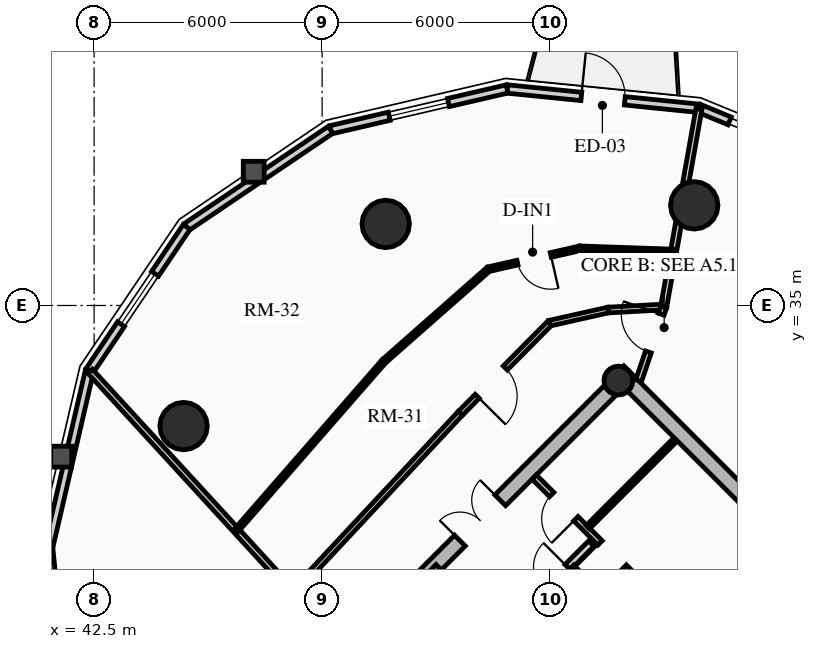
"""IFC4 building model, lengths in metres.
Left out: names, types, materials, properties, quantities, classifications, styles, units other than length and angle.
Written with IfcOpenShell. Run it as: python <this file> out.ifc"""

import sys

from ifc_helpers import new_model, si_unit, direction, frame, frame_2d, origin, origin_2d, place, context, subcontext, project, spatial, rectangle, circle, hollow_circle, extrude, source, transform, mapped, element, fill, save


model = new_model("IFC4")
c1 = context("Model", 3, precision=1e-05, world=origin(), true_north=direction((0.0, 1.0)))
c2 = subcontext(c1, "Body", "Model", "MODEL_VIEW")
j1 = project(units=[si_unit("LENGTHUNIT", "METRE"), si_unit("PLANEANGLEUNIT", "RADIAN")], contexts=[c1])
p1 = place(None, origin())
s1 = spatial("IfcSite", under=j1, at=p1, CompositionType="ELEMENT")
p2 = place(p1, origin())
s2 = spatial("IfcBuilding", under=s1, at=p2, CompositionType="ELEMENT")
p3 = place(p2, frame((0.0, 0.0, 163.24)))
s3 = spatial("IfcBuildingStorey", under=s2, at=p3, CompositionType="ELEMENT", Elevation=163.24)
p4 = place(p3, frame((66.268, 23.298, 0.0), z_axis=(0.0, 0.0, 1.0), x_axis=(-0.707106781187, 0.707106781187, 0.0)))
e1 = element("IfcWall", 1, at=p4, inside=s3, PredefinedType="SHEAR", context=c2, shape_type="SweptSolid", body=[
    extrude(rectangle(XDim=14.1, YDim=0.4, at=frame_2d((7.05, 0.0))), origin(), (0.0, 0.0, 1.0), 2.91),
])
p5 = place(p3, frame((48.873, 25.561, 0.0), z_axis=(0.0, 0.0, 1.0), x_axis=(0.707106781187, 0.707106781187, 0.0)))
e2 = element("IfcWall", 2, at=p5, inside=s3, PredefinedType="SHEAR", context=c2, shape_type="SweptSolid", body=[
    extrude(rectangle(XDim=10.7, YDim=0.4, at=frame_2d((5.35, 0.0))), origin(), (0.0, 0.0, 1.0), 2.91),
])
m1 = source(origin(), c2, "Body", "SweptSolid", [
    extrude(rectangle(XDim=1.5, YDim=2.02, at=frame_2d((0.75, 1.01))), frame((0.0, 0.21, 0.0), z_axis=(0.0, -1.0, 0.0), x_axis=(1.0, 0.0, 0.0)), (0.0, 0.0, 1.0), 0.42),
])
p6 = place(p5, frame((4.6, 0.0, 0.0)))
e3 = element("IfcOpeningElement", 3, at=p6, cuts=e2, PredefinedType="OPENING", context=c2, shape_type="MappedRepresentation", body=[
    mapped(m1, transform((0.0, 0.0, 0.0), x_axis=(1.0, 0.0, 0.0), y_axis=(0.0, 1.0, 0.0), z_axis=(0.0, 0.0, 1.0), scale=1.0)),
])
p7 = place(p3, frame((61.06, 18.373, 0.0), z_axis=(0.0, 0.0, 1.0), x_axis=(-0.707106781187, 0.707106781187, 0.0)))
e4 = element("IfcWall", 4, at=p7, inside=s3, PredefinedType="SHEAR", context=c2, shape_type="SweptSolid", body=[
    extrude(rectangle(XDim=13.7, YDim=0.35, at=frame_2d((6.85, 0.0))), origin(), (0.0, 0.0, 1.0), 2.91),
])
m2 = source(origin(), c2, "Body", "SweptSolid", [
    extrude(rectangle(XDim=1.1, YDim=2.015, at=frame_2d((0.55, 1.007))), frame((0.0, 0.185, 0.0), z_axis=(0.0, -1.0, 0.0), x_axis=(1.0, 0.0, 0.0)), (0.0, 0.0, 1.0), 0.37),
])
p8 = place(p7, frame((4.85, 0.0, 0.0)))
e5 = element("IfcOpeningElement", 5, at=p8, cuts=e4, PredefinedType="OPENING", context=c2, shape_type="MappedRepresentation", body=[
    mapped(m2, transform((0.0, 0.0, 0.0), x_axis=(1.0, 0.0, 0.0), y_axis=(0.0, 1.0, 0.0), z_axis=(0.0, 0.0, 1.0), scale=1.0)),
])
p9 = place(p7, frame((0.625, 0.0, 0.0)))
e6 = element("IfcOpeningElement", 6, at=p9, cuts=e4, PredefinedType="OPENING", context=c2, shape_type="MappedRepresentation", body=[
    mapped(m2, transform((0.0, 0.0, 0.0), x_axis=(1.0, 0.0, 0.0), y_axis=(0.0, 1.0, 0.0), z_axis=(0.0, 0.0, 1.0), scale=1.0)),
])
p10 = place(p7, frame((2.625, 0.0, 0.0)))
e7 = element("IfcOpeningElement", 7, at=p10, cuts=e4, PredefinedType="OPENING", context=c2, shape_type="MappedRepresentation", body=[
    mapped(m2, transform((0.0, 0.0, 0.0), x_axis=(1.0, 0.0, 0.0), y_axis=(0.0, 1.0, 0.0), z_axis=(0.0, 0.0, 1.0), scale=1.0)),
])
m3 = source(origin(), c2, "Body", "SweptSolid", [
    extrude(rectangle(XDim=1.15, YDim=2.02, at=frame_2d((0.575, 1.01))), frame((0.0, 0.185, 0.0), z_axis=(0.0, -1.0, 0.0), x_axis=(1.0, 0.0, 0.0)), (0.0, 0.0, 1.0), 0.37),
])
p11 = place(p7, frame((7.27, 0.0, 0.0)))
e8 = element("IfcOpeningElement", 8, at=p11, cuts=e4, PredefinedType="OPENING", context=c2, shape_type="MappedRepresentation", body=[
    mapped(m3, transform((0.0, 0.0, 0.0), x_axis=(1.0, 0.0, 0.0), y_axis=(0.0, 1.0, 0.0), z_axis=(0.0, 0.0, 1.0), scale=1.0)),
])
p12 = place(p3, frame((58.893, 25.674, 0.0), z_axis=(0.0, 0.0, 1.0), x_axis=(0.707106781187, 0.707106781187, 0.0)))
e9 = element("IfcWall", 9, at=p12, inside=s3, PredefinedType="SHEAR", context=c2, shape_type="SweptSolid", body=[
    extrude(rectangle(XDim=3.285, YDim=0.35, at=frame_2d((1.643, 0.0))), origin(), (0.0, 0.0, 1.0), 2.91),
])
p13 = place(p3, frame((56.294, 33.024, 0.0), z_axis=(0.0, 0.0, 1.0), x_axis=(0.707106781187, 0.707106781187, 0.0)))
e10 = element("IfcColumn", 10, at=p13, inside=s3, PredefinedType="COLUMN", context=c2, shape_type="SweptSolid", body=[
    extrude(hollow_circle(Radius=0.38, WallThickness=0.032, at=origin_2d()), origin(), (0.0, 0.0, 1.0), 2.91),
])
for number, where, z_axis, x_axis in (
    (11, (58.291, 37.635, 0.0), (0.0, 0.0, 1.0), (1.0, 0.0, 0.0)),
    (12, (50.173, 37.146, 0.0), (0.0, 0.0, 1.0), (1.0, 0.0, 0.0)),
    (13, (44.854, 31.827, 0.0), (0.0, 0.0, 1.0), (1.0, 0.0, 0.0)),
):
    element("IfcColumn", number, at=place(p3, frame(where, z_axis=z_axis, x_axis=x_axis)), inside=s3, PredefinedType="USERDEFINED", context=c2, shape_type="SweptSolid", body=[
        extrude(circle(Radius=0.625, at=origin_2d()), origin(), (0.0, 0.0, 1.0), 2.91),
    ])
p14 = place(p3, frame((58.418, 40.189, 0.0), z_axis=(0.0, 0.0, 1.0), x_axis=(0.924556017656, -0.381046152345, 0.0)))
e14 = element("IfcWall", 14, at=p14, inside=s3, PredefinedType="SOLIDWALL", context=c2, shape_type="SweptSolid", body=[
    extrude(rectangle(XDim=0.87, YDim=0.22, at=frame_2d((0.435, 0.0))), origin(), (0.0, 0.0, 1.0), 2.245),
])
p15 = place(p3, frame((53.367, 40.698, 0.0), z_axis=(0.0, 0.0, 1.0), x_axis=(0.994959267396, -0.100279889424, 0.0)))
e15 = element("IfcWall", 15, at=p15, inside=s3, PredefinedType="SOLIDWALL", context=c2, shape_type="SweptSolid", body=[
    extrude(rectangle(XDim=5.076, YDim=0.22, at=frame_2d((2.538, 0.0))), origin(), (0.0, 0.0, 1.0), 2.245),
])
m4 = source(origin(), c2, "Body", "SweptSolid", [
    extrude(rectangle(XDim=1.15, YDim=2.005, at=frame_2d((0.575, 1.002))), frame((0.0, 0.12, 0.0), z_axis=(0.0, -1.0, 0.0), x_axis=(1.0, 0.0, 0.0)), (0.0, 0.0, 1.0), 0.24),
])
p16 = place(p15, frame((1.963, 0.0, 0.0)))
e16 = element("IfcOpeningElement", 16, at=p16, cuts=e15, PredefinedType="OPENING", context=c2, shape_type="MappedRepresentation", body=[
    mapped(m4, transform((0.0, 0.0, 0.0), x_axis=(1.0, 0.0, 0.0), y_axis=(0.0, 1.0, 0.0), z_axis=(0.0, 0.0, 1.0), scale=1.0)),
])
p17 = place(p3, frame((48.721, 39.622, 0.0), z_axis=(0.0, 0.0, 1.0), x_axis=(0.974206226622, 0.225659540039, 0.0)))
e17 = element("IfcWall", 17, at=p17, inside=s3, PredefinedType="SOLIDWALL", context=c2, shape_type="SweptSolid", body=[
    extrude(rectangle(XDim=4.769, YDim=0.22, at=frame_2d((2.385, 0.0))), origin(), (0.0, 0.0, 1.0), 2.245),
])
m5 = source(origin(), c2, "Body", "SweptSolid", [
    extrude(rectangle(XDim=1.6, YDim=1.3, at=frame_2d((0.8, 0.65))), frame((0.0, 0.12, 0.0), z_axis=(0.0, -1.0, 0.0), x_axis=(1.0, 0.0, 0.0)), (0.0, 0.0, 1.0), 0.24),
])
p18 = place(p17, frame((1.585, 0.0, 0.65)))
e18 = element("IfcOpeningElement", 18, at=p18, cuts=e17, PredefinedType="OPENING", context=c2, shape_type="MappedRepresentation", body=[
    mapped(m5, transform((0.0, 0.0, 0.0), x_axis=(1.0, 0.0, 0.0), y_axis=(0.0, 1.0, 0.0), z_axis=(0.0, 0.0, 1.0), scale=1.0)),
])
p19 = place(p3, frame((44.935, 37.065, 0.0), z_axis=(0.0, 0.0, 1.0), x_axis=(0.828739009952, 0.559635286042, 0.0)))
e19 = element("IfcWall", 19, at=p19, inside=s3, PredefinedType="SOLIDWALL", context=c2, shape_type="SweptSolid", body=[
    extrude(rectangle(XDim=4.569, YDim=0.22, at=frame_2d((2.284, 0.0))), origin(), (0.0, 0.0, 1.0), 2.245),
])
p20 = place(p3, frame((42.378, 33.279, 0.0), z_axis=(0.0, 0.0, 1.0), x_axis=(0.559635286042, 0.828739009952, 0.0)))
e20 = element("IfcWall", 20, at=p20, inside=s3, PredefinedType="SOLIDWALL", context=c2, shape_type="SweptSolid", body=[
    extrude(rectangle(XDim=4.569, YDim=0.22, at=frame_2d((2.284, 0.0))), origin(), (0.0, 0.0, 1.0), 2.245),
])
p21 = place(p20, frame((1.484, 0.0, 0.65)))
e21 = element("IfcOpeningElement", 21, at=p21, cuts=e20, PredefinedType="OPENING", context=c2, shape_type="MappedRepresentation", body=[
    mapped(m5, transform((0.0, 0.0, 0.0), x_axis=(1.0, 0.0, 0.0), y_axis=(0.0, 1.0, 0.0), z_axis=(0.0, 0.0, 1.0), scale=1.0)),
])
p22 = place(p3, frame((41.302, 28.633, 0.0), z_axis=(0.0, 0.0, 1.0), x_axis=(0.225659540039, 0.974206226622, 0.0)))
e22 = element("IfcWall", 22, at=p22, inside=s3, PredefinedType="SOLIDWALL", context=c2, shape_type="SweptSolid", body=[
    extrude(rectangle(XDim=4.769, YDim=0.22, at=frame_2d((2.385, 0.0))), origin(), (0.0, 0.0, 1.0), 2.245),
])
p23 = place(p3, frame((41.811, 23.582, 0.0), z_axis=(0.0, 0.0, 1.0), x_axis=(-0.100279889424, 0.994959267396, 0.0)))
e23 = element("IfcWall", 23, at=p23, inside=s3, PredefinedType="SOLIDWALL", context=c2, shape_type="SweptSolid", body=[
    extrude(rectangle(XDim=5.076, YDim=0.22, at=frame_2d((2.538, 0.0))), origin(), (0.0, 0.0, 1.0), 2.245),
])
p24 = place(p23, frame((1.738, 0.0, 0.65)))
e24 = element("IfcOpeningElement", 24, at=p24, cuts=e23, PredefinedType="OPENING", context=c2, shape_type="MappedRepresentation", body=[
    mapped(m5, transform((0.0, 0.0, 0.0), x_axis=(1.0, 0.0, 0.0), y_axis=(0.0, 1.0, 0.0), z_axis=(0.0, 0.0, 1.0), scale=1.0)),
])
p25 = place(p3, frame((53.264, 26.416, 0.0), z_axis=(0.0, 0.0, 1.0), x_axis=(0.707106781187, 0.707106781187, 0.0)))
e25 = element("IfcWall", 25, at=p25, inside=s3, PredefinedType="PARTITIONING", context=c2, shape_type="SweptSolid", body=[
    extrude(rectangle(XDim=3.28, YDim=0.2, at=frame_2d((1.64, 0.0))), origin(), (0.0, 0.0, 1.0), 2.675),
])
m6 = source(origin(), c2, "Body", "SweptSolid", [
    extrude(rectangle(XDim=1.0, YDim=2.015, at=frame_2d((0.5, 1.007))), frame((0.0, 0.11, 0.0), z_axis=(0.0, -1.0, 0.0), x_axis=(1.0, 0.0, 0.0)), (0.0, 0.0, 1.0), 0.22),
])
p26 = place(p25, frame((0.14, 0.0, 0.0)))
e26 = element("IfcOpeningElement", 26, at=p26, cuts=e25, PredefinedType="OPENING", context=c2, shape_type="MappedRepresentation", body=[
    mapped(m6, transform((0.0, 0.0, 0.0), x_axis=(1.0, 0.0, 0.0), y_axis=(0.0, 1.0, 0.0), z_axis=(0.0, 0.0, 1.0), scale=1.0)),
])
m7 = source(origin(), c2, "Body", "SweptSolid", [
    extrude(rectangle(XDim=0.9, YDim=2.005, at=frame_2d((0.45, 1.002))), frame((0.0, 0.11, 0.0), z_axis=(0.0, -1.0, 0.0), x_axis=(1.0, 0.0, 0.0)), (0.0, 0.0, 1.0), 0.22),
])
p27 = place(p25, frame((1.5, 0.0, 0.0)))
e27 = element("IfcOpeningElement", 27, at=p27, cuts=e25, PredefinedType="OPENING", context=c2, shape_type="MappedRepresentation", body=[
    mapped(m7, transform((0.0, 0.0, 0.0), x_axis=(1.0, 0.0, 0.0), y_axis=(0.0, 1.0, 0.0), z_axis=(0.0, 0.0, 1.0), scale=1.0)),
])
p28 = place(p3, frame((56.673, 26.529, 0.0), z_axis=(0.0, 0.0, 1.0), x_axis=(-0.707052764397, 0.70716079385, 0.0)))
e28 = element("IfcWall", 28, at=p28, inside=s3, PredefinedType="PARTITIONING", context=c2, shape_type="SweptSolid", body=[
    extrude(rectangle(XDim=2.26, YDim=0.125, at=frame_2d((1.13, 0.0))), origin(), (0.0, 0.0, 1.0), 2.675),
])
m8 = source(origin(), c2, "Body", "SweptSolid", [
    extrude(rectangle(XDim=0.9, YDim=2.005, at=frame_2d((0.45, 1.002))), frame((0.0, 0.073, 0.0), z_axis=(0.0, -1.0, 0.0), x_axis=(1.0, 0.0, 0.0)), (0.0, 0.0, 1.0), 0.145),
])
p29 = place(p28, frame((0.65, 0.0, 0.0)))
e29 = element("IfcOpeningElement", 29, at=p29, cuts=e28, PredefinedType="OPENING", context=c2, shape_type="MappedRepresentation", body=[
    mapped(m8, transform((0.0, 0.0, 0.0), x_axis=(1.0, 0.0, 0.0), y_axis=(0.0, 1.0, 0.0), z_axis=(0.0, 0.0, 1.0), scale=1.0)),
])
p30 = place(p3, frame((56.839, 27.728, 0.0), z_axis=(0.0, 0.0, 1.0), x_axis=(-0.707106781187, 0.707106781187, 0.0)))
e30 = element("IfcWall", 30, at=p30, inside=s3, PredefinedType="PARTITIONING", context=c2, shape_type="SweptSolid", body=[
    extrude(rectangle(XDim=3.9, YDim=0.16, at=frame_2d((1.95, 0.0))), origin(), (0.0, 0.0, 1.0), 2.675),
])
m9 = source(origin(), c2, "Body", "SweptSolid", [
    extrude(rectangle(XDim=0.9, YDim=2.005, at=frame_2d((0.45, 1.002))), frame((0.0, 0.09, 0.0), z_axis=(0.0, -1.0, 0.0), x_axis=(1.0, 0.0, 0.0)), (0.0, 0.0, 1.0), 0.18),
])
p31 = place(p30, frame((0.55, 0.0, 0.0)))
e31 = element("IfcOpeningElement", 31, at=p31, cuts=e30, PredefinedType="OPENING", context=c2, shape_type="MappedRepresentation", body=[
    mapped(m9, transform((0.0, 0.0, 0.0), x_axis=(1.0, 0.0, 0.0), y_axis=(0.0, 1.0, 0.0), z_axis=(0.0, 0.0, 1.0), scale=1.0)),
])
p32 = place(p30, frame((2.35, 0.0, 0.0)))
e32 = element("IfcOpeningElement", 32, at=p32, cuts=e30, PredefinedType="OPENING", context=c2, shape_type="MappedRepresentation", body=[
    mapped(m9, transform((0.0, 0.0, 0.0), x_axis=(1.0, 0.0, 0.0), y_axis=(0.0, 1.0, 0.0), z_axis=(0.0, 0.0, 1.0), scale=1.0)),
])
p33 = place(p3, frame((55.492, 29.167, 0.0), z_axis=(0.0, 0.0, 1.0), x_axis=(0.707144688645, 0.707068871696, 0.0)))
e33 = element("IfcWall", 33, at=p33, inside=s3, PredefinedType="PARTITIONING", context=c2, shape_type="SweptSolid", body=[
    extrude(rectangle(XDim=3.22, YDim=0.125, at=frame_2d((1.61, 0.0))), origin(), (0.0, 0.0, 1.0), 2.212),
])
p34 = place(p3, frame((57.486, 34.96, 0.0), z_axis=(0.0, 0.0, 1.0), x_axis=(-0.998483871836, -0.055045051404, 0.0)))
e34 = element("IfcWall", 34, at=p34, inside=s3, PredefinedType="PARTITIONING", context=c2, shape_type="SweptSolid", body=[
    extrude(rectangle(XDim=1.464, YDim=0.15, at=frame_2d((0.732, 0.0))), origin(), (0.0, 0.0, 1.0), 2.245),
])
p35 = place(p3, frame((56.025, 34.88, 0.0), z_axis=(0.0, 0.0, 1.0), x_axis=(-0.975729093394, -0.218981132301, 0.0)))
e35 = element("IfcWall", 35, at=p35, inside=s3, PredefinedType="PARTITIONING", context=c2, shape_type="SweptSolid", body=[
    extrude(rectangle(XDim=1.575, YDim=0.15, at=frame_2d((0.788, 0.0))), origin(), (0.0, 0.0, 1.0), 2.245),
])
p36 = place(p3, frame((54.488, 34.535, 0.0), z_axis=(0.0, 0.0, 1.0), x_axis=(-0.703666289339, -0.710530613871, 0.0)))
e36 = element("IfcWall", 36, at=p36, inside=s3, PredefinedType="PARTITIONING", context=c2, shape_type="SweptSolid", body=[
    extrude(rectangle(XDim=3.343, YDim=0.15, at=frame_2d((1.672, 0.0))), origin(), (0.0, 0.0, 1.0), 2.245),
])
m10 = source(origin(), c2, "Body", "SweptSolid", [
    extrude(rectangle(XDim=1.05, YDim=2.015, at=frame_2d((0.525, 1.007))), frame((0.0, 0.085, 0.0), z_axis=(0.0, -1.0, 0.0), x_axis=(1.0, 0.0, 0.0)), (0.0, 0.0, 1.0), 0.17),
])
p37 = place(p36, frame((1.66, 0.0, 0.0)))
e37 = element("IfcOpeningElement", 37, at=p37, cuts=e36, PredefinedType="OPENING", context=c2, shape_type="MappedRepresentation", body=[
    mapped(m10, transform((0.0, 0.0, 0.0), x_axis=(1.0, 0.0, 0.0), y_axis=(0.0, 1.0, 0.0), z_axis=(0.0, 0.0, 1.0), scale=1.0)),
])
p38 = place(p3, frame((52.135, 32.159, 0.0), z_axis=(0.0, 0.0, 1.0), x_axis=(-0.682546302454, -0.730842353047, 0.0)))
e38 = element("IfcWall", 38, at=p38, inside=s3, PredefinedType="PARTITIONING", context=c2, shape_type="SweptSolid", body=[
    extrude(rectangle(XDim=6.445, YDim=0.15, at=frame_2d((3.223, 0.0))), origin(), (0.0, 0.0, 1.0), 2.245),
])
p39 = place(p3, frame((57.486, 34.96, 0.0), z_axis=(0.0, 0.0, 1.0), x_axis=(0.175432895983, 0.984491391027, 0.0)))
e39 = element("IfcWall", 39, at=p39, inside=s3, PredefinedType="PARTITIONING", context=c2, shape_type="SweptSolid", body=[
    extrude(rectangle(XDim=5.291, YDim=0.16, at=frame_2d((2.646, 0.0))), origin(), (0.0, 0.0, 1.0), 2.245),
])
p40 = place(p3, frame((47.736, 27.449, 0.0), z_axis=(0.0, 0.0, 1.0), x_axis=(-0.676056254668, 0.736850012231, 0.0)))
e40 = element("IfcWall", 40, at=p40, inside=s3, PredefinedType="PARTITIONING", context=c2, shape_type="SweptSolid", body=[
    extrude(rectangle(XDim=7.899, YDim=0.16, at=frame_2d((3.95, 0.0))), origin(), (0.0, 0.0, 1.0), 2.245),
])
p41 = place(p3, frame((56.828, 33.021, 0.0), z_axis=(0.0, 0.0, 1.0), x_axis=(0.321300161671, 0.94697740528, 0.0)))
e41 = element("IfcWall", 41, at=p41, inside=s3, PredefinedType="PARTITIONING", context=c2, shape_type="SweptSolid", body=[
    extrude(rectangle(XDim=2.049, YDim=0.16, at=frame_2d((1.024, 0.0))), origin(), (0.0, 0.0, 1.0), 2.245),
])
m11 = source(origin(), c2, "Body", "SweptSolid", [
    extrude(rectangle(XDim=1.05, YDim=2.015, at=frame_2d((0.525, 1.007))), frame((0.0, 0.09, 0.0), z_axis=(0.0, -1.0, 0.0), x_axis=(1.0, 0.0, 0.0)), (0.0, 0.0, 1.0), 0.18),
])
p42 = place(p41, frame((0.798, 0.0, 0.0)))
e42 = element("IfcOpeningElement", 42, at=p42, cuts=e41, PredefinedType="OPENING", context=c2, shape_type="MappedRepresentation", body=[
    mapped(m11, transform((0.0, 0.0, 0.0), x_axis=(1.0, 0.0, 0.0), y_axis=(0.0, 1.0, 0.0), z_axis=(0.0, 0.0, 1.0), scale=1.0)),
])
p43 = place(p3, frame((57.746, 36.419, 0.0), z_axis=(0.0, 0.0, 1.0), x_axis=(-0.999409872703, 0.03434976484, 0.0)))
e43 = element("IfcWall", 43, at=p43, inside=s3, PredefinedType="PARTITIONING", context=c2, shape_type="SweptSolid", body=[
    extrude(rectangle(XDim=2.466, YDim=0.125, at=frame_2d((1.233, 0.0))), origin(), (0.0, 0.0, 1.0), 2.245),
])
p44 = place(p3, frame((55.281, 36.504, 0.0), z_axis=(0.0, 0.0, 1.0), x_axis=(-0.974908832019, -0.222604513096, 0.0)))
e44 = element("IfcWall", 44, at=p44, inside=s3, PredefinedType="PARTITIONING", context=c2, shape_type="SweptSolid", body=[
    extrude(rectangle(XDim=2.468, YDim=0.125, at=frame_2d((1.234, 0.0))), origin(), (0.0, 0.0, 1.0), 2.245),
])
p45 = place(p44, frame((0.784, 0.0, 0.0)))
e45 = element("IfcOpeningElement", 45, at=p45, cuts=e44, PredefinedType="OPENING", context=c2, shape_type="MappedRepresentation", body=[
    mapped(m8, transform((0.0, 0.0, 0.0), x_axis=(1.0, 0.0, 0.0), y_axis=(0.0, 1.0, 0.0), z_axis=(0.0, 0.0, 1.0), scale=1.0)),
])
p46 = place(p3, frame((52.876, 35.954, 0.0), z_axis=(0.0, 0.0, 1.0), x_axis=(-0.750317340408, -0.661077823469, 0.0)))
e46 = element("IfcWall", 46, at=p46, inside=s3, PredefinedType="PARTITIONING", context=c2, shape_type="SweptSolid", body=[
    extrude(rectangle(XDim=3.669, YDim=0.125, at=frame_2d((1.834, 0.0))), origin(), (0.0, 0.0, 1.0), 2.245),
])
p47 = place(p3, frame((50.123, 33.529, 0.0), z_axis=(0.0, 0.0, 1.0), x_axis=(-0.657371249324, -0.753566878626, 0.0)))
e47 = element("IfcWall", 47, at=p47, inside=s3, PredefinedType="PARTITIONING", context=c2, shape_type="SweptSolid", body=[
    extrude(rectangle(XDim=5.906, YDim=0.125, at=frame_2d((2.953, 0.0))), origin(), (0.0, 0.0, 1.0), 2.245),
])
m12 = source(origin(), c2, "Body", "SweptSolid", [
    extrude(rectangle(XDim=1.15, YDim=2.005, at=frame_2d((0.575, 1.002))), frame((0.0, 0.025, 0.0), z_axis=(0.0, -1.0, 0.0), x_axis=(1.0, 0.0, 0.0)), (0.0, 0.0, 1.0), 0.05),
])
p48 = place(p16, origin())
e48 = element("IfcDoor", 48, at=p48, inside=s3, OperationType="SINGLE_SWING_LEFT", PredefinedType="DOOR", context=c2, shape_type="MappedRepresentation", body=[
    mapped(m12, transform((0.0, 0.0, 0.0), x_axis=(1.0, 0.0, 0.0), y_axis=(0.0, 1.0, 0.0), z_axis=(0.0, 0.0, 1.0), scale=1.0)),
])
fill(e16, e48)
m13 = source(origin(), c2, "Body", "SweptSolid", [
    extrude(rectangle(XDim=1.6, YDim=1.3, at=frame_2d((0.8, 0.65))), frame((0.0, 0.03, 0.0), z_axis=(0.0, -1.0, 0.0), x_axis=(1.0, 0.0, 0.0)), (0.0, 0.0, 1.0), 0.06),
])
p49 = place(p18, origin())
e49 = element("IfcWindow", 49, at=p49, inside=s3, PartitioningType="SINGLE_PANEL", PredefinedType="WINDOW", context=c2, shape_type="MappedRepresentation", body=[
    mapped(m13, transform((0.0, 0.0, 0.0), x_axis=(1.0, 0.0, 0.0), y_axis=(0.0, 1.0, 0.0), z_axis=(0.0, 0.0, 1.0), scale=1.0)),
])
fill(e18, e49)
p50 = place(p21, origin())
e50 = element("IfcWindow", 50, at=p50, inside=s3, PartitioningType="SINGLE_PANEL", PredefinedType="WINDOW", context=c2, shape_type="MappedRepresentation", body=[
    mapped(m13, transform((0.0, 0.0, 0.0), x_axis=(1.0, 0.0, 0.0), y_axis=(0.0, 1.0, 0.0), z_axis=(0.0, 0.0, 1.0), scale=1.0)),
])
fill(e21, e50)
m14 = source(origin(), c2, "Body", "SweptSolid", [
    extrude(rectangle(XDim=1.5, YDim=2.02, at=frame_2d((0.75, 1.01))), frame((0.0, 0.025, 0.0), z_axis=(0.0, -1.0, 0.0), x_axis=(1.0, 0.0, 0.0)), (0.0, 0.0, 1.0), 0.05),
])
p51 = place(p6, origin())
e51 = element("IfcDoor", 51, at=p51, inside=s3, OperationType="DOUBLE_DOOR_SINGLE_SWING", PredefinedType="DOOR", context=c2, shape_type="MappedRepresentation", body=[
    mapped(m14, transform((0.0, 0.0, 0.0), x_axis=(1.0, 0.0, 0.0), y_axis=(0.0, 1.0, 0.0), z_axis=(0.0, 0.0, 1.0), scale=1.0)),
])
fill(e3, e51)
m15 = source(origin(), c2, "Body", "SweptSolid", [
    extrude(rectangle(XDim=0.9, YDim=2.005, at=frame_2d((0.45, 1.002))), frame((0.0, 0.025, 0.0), z_axis=(0.0, -1.0, 0.0), x_axis=(1.0, 0.0, 0.0)), (0.0, 0.0, 1.0), 0.05),
])
p52 = place(p27, origin())
e52 = element("IfcDoor", 52, at=p52, inside=s3, OperationType="SINGLE_SWING_RIGHT", PredefinedType="DOOR", context=c2, shape_type="MappedRepresentation", body=[
    mapped(m15, transform((0.0, 0.0, 0.0), x_axis=(1.0, 0.0, 0.0), y_axis=(0.0, 1.0, 0.0), z_axis=(0.0, 0.0, 1.0), scale=1.0)),
])
fill(e27, e52)
p53 = place(p31, origin())
e53 = element("IfcDoor", 53, at=p53, inside=s3, OperationType="SINGLE_SWING_RIGHT", PredefinedType="DOOR", context=c2, shape_type="MappedRepresentation", body=[
    mapped(m15, transform((0.0, 0.0, 0.0), x_axis=(1.0, 0.0, 0.0), y_axis=(0.0, 1.0, 0.0), z_axis=(0.0, 0.0, 1.0), scale=1.0)),
])
fill(e31, e53)
p54 = place(p32, origin())
e54 = element("IfcDoor", 54, at=p54, inside=s3, OperationType="SINGLE_SWING_LEFT", PredefinedType="DOOR", context=c2, shape_type="MappedRepresentation", body=[
    mapped(m15, transform((0.0, 0.0, 0.0), x_axis=(1.0, 0.0, 0.0), y_axis=(0.0, 1.0, 0.0), z_axis=(0.0, 0.0, 1.0), scale=1.0)),
])
fill(e32, e54)
m16 = source(origin(), c2, "Body", "SweptSolid", [
    extrude(rectangle(XDim=1.05, YDim=2.015, at=frame_2d((0.525, 1.007))), frame((0.0, 0.025, 0.0), z_axis=(0.0, -1.0, 0.0), x_axis=(1.0, 0.0, 0.0)), (0.0, 0.0, 1.0), 0.05),
])
p55 = place(p42, origin())
e55 = element("IfcDoor", 55, at=p55, inside=s3, OperationType="SINGLE_SWING_RIGHT", PredefinedType="DOOR", context=c2, shape_type="MappedRepresentation", body=[
    mapped(m16, transform((0.0, 0.0, 0.0), x_axis=(1.0, 0.0, 0.0), y_axis=(0.0, 1.0, 0.0), z_axis=(0.0, 0.0, 1.0), scale=1.0)),
])
fill(e42, e55)
p56 = place(p37, origin())
e56 = element("IfcDoor", 56, at=p56, inside=s3, OperationType="SINGLE_SWING_RIGHT", PredefinedType="DOOR", context=c2, shape_type="MappedRepresentation", body=[
    mapped(m16, transform((0.0, 0.0, 0.0), x_axis=(1.0, 0.0, 0.0), y_axis=(0.0, 1.0, 0.0), z_axis=(0.0, 0.0, 1.0), scale=1.0)),
])
fill(e37, e56)
p57 = place(p45, origin())
e57 = element("IfcDoor", 57, at=p57, inside=s3, OperationType="SINGLE_SWING_LEFT", PredefinedType="DOOR", context=c2, shape_type="MappedRepresentation", body=[
    mapped(m15, transform((0.0, 0.0, 0.0), x_axis=(1.0, 0.0, 0.0), y_axis=(0.0, 1.0, 0.0), z_axis=(0.0, 0.0, 1.0), scale=1.0)),
])
fill(e45, e57)
save(model, sys.argv[1])
